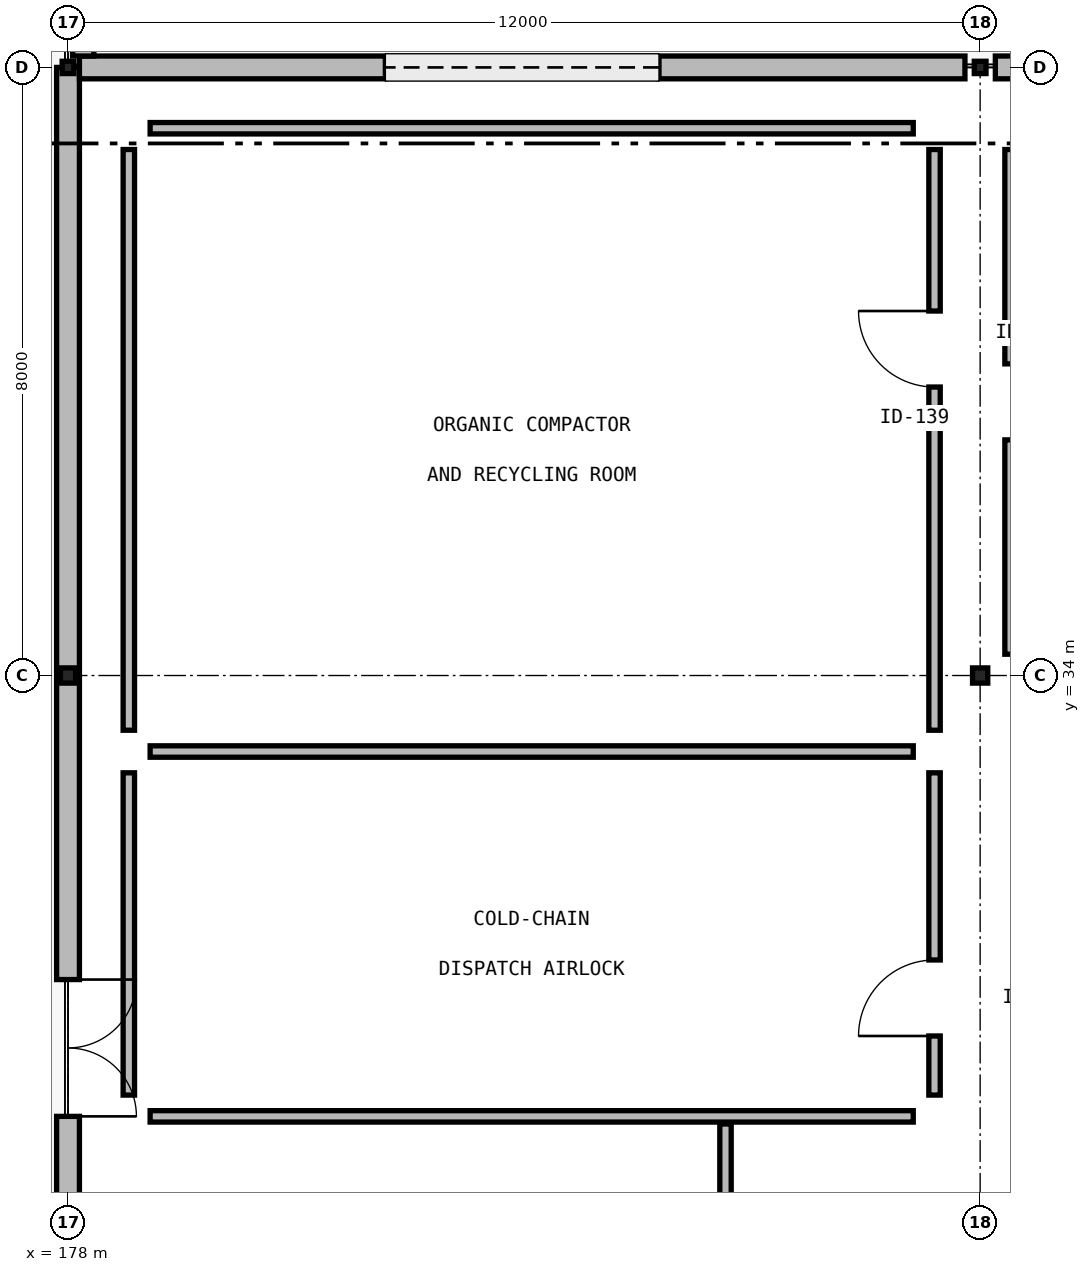
"""IFC4 building model, lengths in metres.
Left out: names, types, materials, properties, quantities, classifications, styles, units other than length and angle.
Written with IfcOpenShell. Run it as: python <this file> out.ifc"""

import sys

from ifc_helpers import new_model, si_unit, direction, frame, frame_2d, origin, origin_2d_with_axis, place, context, subcontext, project, spatial, rectangle, hollow_rectangle, i_section, extrude, element, fill, save


model = new_model("IFC4")
c1 = context("Model", 3, precision=1e-05, world=origin(), true_north=direction((0.0, 1.0)))
c2 = subcontext(c1, "Body", "Model", "MODEL_VIEW")
j1 = project(units=[si_unit("LENGTHUNIT", "METRE"), si_unit("PLANEANGLEUNIT", "RADIAN")], contexts=[c1])
p1 = place(None, origin())
s1 = spatial("IfcSite", under=j1, at=p1, CompositionType="ELEMENT")
p2 = place(p1, origin())
s2 = spatial("IfcBuilding", under=s1, at=p2, CompositionType="ELEMENT")
p3 = place(p2, origin())
s3 = spatial("IfcBuildingStorey", under=s2, at=p3, CompositionType="ELEMENT", Elevation=0.0)
p4 = place(p3, frame((178.0, 34.0, 0.0), z_axis=(0.0, 0.0, 1.0), x_axis=(1.0, 0.0, 0.0)))
e1 = element("IfcColumn", 1, at=p4, inside=s3, PredefinedType="COLUMN", context=c2, shape_type="SweptSolid", body=[
    extrude(hollow_rectangle(XDim=0.2, YDim=0.2, WallThickness=0.008, InnerFilletRadius=0.008, OuterFilletRadius=0.016, at=origin_2d_with_axis()), origin(), (0.0, 0.0, 1.0), 4.63),
])
p5 = place(p3, frame((178.0, 42.0, -0.28), z_axis=(0.0, 0.0, 1.0), x_axis=(1.0, 0.0, 0.0)))
e2 = element("IfcColumn", 2, at=p5, inside=s3, PredefinedType="COLUMN", context=c2, shape_type="SweptSolid", body=[
    extrude(i_section(OverallWidth=0.154, OverallDepth=0.162, WebThickness=0.008, FlangeThickness=0.011, FilletRadius=0.009, at=origin_2d_with_axis()), origin(), (0.0, 0.0, 1.0), 4.91),
])
p6 = place(p3, frame((190.0, 34.0, 0.0), z_axis=(0.0, 0.0, 1.0), x_axis=(1.0, 0.0, 0.0)))
e3 = element("IfcColumn", 3, at=p6, inside=s3, PredefinedType="COLUMN", context=c2, shape_type="SweptSolid", body=[
    extrude(hollow_rectangle(XDim=0.2, YDim=0.2, WallThickness=0.008, InnerFilletRadius=0.008, OuterFilletRadius=0.016, at=origin_2d_with_axis()), origin(), (0.0, 0.0, 1.0), 4.63),
])
p7 = place(p3, frame((190.0, 42.0, -0.28), z_axis=(0.0, 0.0, 1.0), x_axis=(1.0, 0.0, 0.0)))
e4 = element("IfcColumn", 4, at=p7, inside=s3, PredefinedType="COLUMN", context=c2, shape_type="SweptSolid", body=[
    extrude(i_section(OverallWidth=0.154, OverallDepth=0.162, WebThickness=0.008, FlangeThickness=0.011, FilletRadius=0.009, at=origin_2d_with_axis()), origin(), (0.0, 0.0, 1.0), 4.91),
])
p8 = place(p3, frame((178.0, 42.0, 0.0), z_axis=(0.0, 0.0, 1.0), x_axis=(0.0, -1.0, 0.0)))
e5 = element("IfcWall", 5, at=p8, inside=s3, PredefinedType="SOLIDWALL", context=c2, shape_type="SweptSolid", body=[
    extrude(rectangle(XDim=28.0, YDim=0.3, at=frame_2d((14.0, 0.0), x_axis=(1.0, 0.0))), origin(), (0.0, 0.0, 1.0), 4.18),
])
p9 = place(p8, frame((12.0, 0.0, 0.0)))
e6 = element("IfcOpeningElement", 6, at=p9, cuts=e5, PredefinedType="OPENING", context=c2, shape_type="SweptSolid", body=[
    extrude(rectangle(XDim=1.8, YDim=2.4, at=frame_2d((0.9, 1.2), x_axis=(1.0, 0.0))), frame((0.0, 0.16, 0.0), z_axis=(0.0, -1.0, 0.0), x_axis=(1.0, 0.0, 0.0)), (0.0, 0.0, 1.0), 0.32),
])
p10 = place(p3, frame((189.8, 42.0, 0.0), z_axis=(0.0, 0.0, 1.0), x_axis=(-1.0, 0.0, 0.0)))
e7 = element("IfcWall", 7, at=p10, inside=s3, PredefinedType="SOLIDWALL", context=c2, shape_type="SweptSolid", body=[
    extrude(rectangle(XDim=11.65, YDim=0.3, at=frame_2d((5.825, 0.0), x_axis=(1.0, 0.0))), origin(), (0.0, 0.0, 1.0), 4.15),
])
p11 = place(p10, frame((4.025, 0.0, 0.0)))
e8 = element("IfcOpeningElement", 8, at=p11, cuts=e7, PredefinedType="OPENING", context=c2, shape_type="SweptSolid", body=[
    extrude(rectangle(XDim=3.6, YDim=3.6, at=frame_2d((1.8, 1.8), x_axis=(1.0, 0.0))), frame((0.0, 0.16, 0.0), z_axis=(0.0, -1.0, 0.0), x_axis=(1.0, 0.0, 0.0)), (0.0, 0.0, 1.0), 0.32),
])
p12 = place(p3, frame((201.8, 42.0, 0.0), z_axis=(0.0, 0.0, 1.0), x_axis=(-1.0, 0.0, 0.0)))
e9 = element("IfcWall", 9, at=p12, inside=s3, PredefinedType="SOLIDWALL", context=c2, shape_type="SweptSolid", body=[
    extrude(rectangle(XDim=11.6, YDim=0.3, at=frame_2d((5.8, 0.0), x_axis=(1.0, 0.0))), origin(), (0.0, 0.0, 1.0), 4.15),
])
p13 = place(p12, frame((4.0, 0.0, 0.0)))
e10 = element("IfcOpeningElement", 10, at=p13, cuts=e9, PredefinedType="OPENING", context=c2, shape_type="SweptSolid", body=[
    extrude(rectangle(XDim=3.6, YDim=3.6, at=frame_2d((1.8, 1.8), x_axis=(1.0, 0.0))), frame((0.0, 0.16, 0.0), z_axis=(0.0, -1.0, 0.0), x_axis=(1.0, 0.0, 0.0)), (0.0, 0.0, 1.0), 0.32),
])
p14 = place(p3, frame((178.2, 73.6, 0.0), z_axis=(0.0, 0.0, 1.0), x_axis=(0.0, -1.0, 0.0)))
e11 = element("IfcWall", 11, at=p14, inside=s3, PredefinedType="SOLIDWALL", context=c2, shape_type="SweptSolid", body=[
    extrude(rectangle(XDim=31.45, YDim=0.28, at=frame_2d((15.725, 0.0), x_axis=(1.0, 0.0))), origin(), (0.0, 0.0, 1.0), 3.9),
])
p15 = place(p14, frame((14.0, 0.0, 0.0)))
e12 = element("IfcOpeningElement", 12, at=p15, cuts=e11, PredefinedType="OPENING", context=c2, shape_type="SweptSolid", body=[
    extrude(rectangle(XDim=1.8, YDim=2.4, at=frame_2d((0.9, 1.2), x_axis=(1.0, 0.0))), frame((0.0, 0.15, 0.0), z_axis=(0.0, -1.0, 0.0), x_axis=(1.0, 0.0, 0.0)), (0.0, 0.0, 1.0), 0.3),
])
p16 = place(p3, frame((186.65, 23.18, 0.0), z_axis=(0.0, 0.0, 1.0), x_axis=(0.0, 1.0, 0.0)))
e13 = element("IfcWall", 13, at=p16, inside=s3, PredefinedType="PARTITIONING", context=c2, shape_type="SweptSolid", body=[
    extrude(rectangle(XDim=4.92, YDim=0.15, at=frame_2d((2.46, 0.0), x_axis=(1.0, 0.0))), origin(), (0.0, 0.0, 1.0), 4.08),
])
p17 = place(p16, frame((1.96, 0.0, 0.0)))
e14 = element("IfcOpeningElement", 14, at=p17, cuts=e13, PredefinedType="OPENING", context=c2, shape_type="SweptSolid", body=[
    extrude(rectangle(XDim=1.0, YDim=2.15, at=frame_2d((0.5, 1.075), x_axis=(1.0, 0.0))), frame((0.0, 0.085, 0.0), z_axis=(0.0, -1.0, 0.0), x_axis=(1.0, 0.0, 0.0)), (0.0, 0.0, 1.0), 0.17),
])
p18 = place(p3, frame((190.4, 40.92, 0.0), z_axis=(0.0, 0.0, 1.0), x_axis=(0.0, -1.0, 0.0)))
e15 = element("IfcWall", 15, at=p18, inside=s3, PredefinedType="PARTITIONING", context=c2, shape_type="SweptSolid", body=[
    extrude(rectangle(XDim=6.64, YDim=0.15, at=frame_2d((3.32, 0.0), x_axis=(1.0, 0.0))), origin(), (0.0, 0.0, 1.0), 3.62),
])
p19 = place(p18, frame((2.82, 0.0, 0.0)))
e16 = element("IfcOpeningElement", 16, at=p19, cuts=e15, PredefinedType="OPENING", context=c2, shape_type="SweptSolid", body=[
    extrude(rectangle(XDim=1.0, YDim=2.15, at=frame_2d((0.5, 1.075), x_axis=(1.0, 0.0))), frame((0.0, 0.085, 0.0), z_axis=(0.0, -1.0, 0.0), x_axis=(1.0, 0.0, 0.0)), (0.0, 0.0, 1.0), 0.17),
])
p20 = place(p3, frame((179.08, 28.2, 0.0), z_axis=(0.0, 0.0, 1.0), x_axis=(1.0, 0.0, 0.0)))
e17 = element("IfcWall", 17, at=p20, inside=s3, PredefinedType="PARTITIONING", context=c2, shape_type="SweptSolid", body=[
    extrude(rectangle(XDim=10.04, YDim=0.15, at=frame_2d((5.02, 0.0), x_axis=(1.0, 0.0))), origin(), (0.0, 0.0, 1.0), 3.62),
])
p21 = place(p3, frame((189.4, 28.48, 0.0), z_axis=(0.0, 0.0, 1.0), x_axis=(0.0, 1.0, 0.0)))
e18 = element("IfcWall", 18, at=p21, inside=s3, PredefinedType="PARTITIONING", context=c2, shape_type="SweptSolid", body=[
    extrude(rectangle(XDim=4.24, YDim=0.15, at=frame_2d((2.12, 0.0), x_axis=(1.0, 0.0))), origin(), (0.0, 0.0, 1.0), 3.62),
])
p22 = place(p21, frame((0.778, 0.0, 0.0)))
e19 = element("IfcOpeningElement", 19, at=p22, cuts=e18, PredefinedType="OPENING", context=c2, shape_type="SweptSolid", body=[
    extrude(rectangle(XDim=1.0, YDim=2.15, at=frame_2d((0.5, 1.075), x_axis=(1.0, 0.0))), frame((0.0, 0.085, 0.0), z_axis=(0.0, -1.0, 0.0), x_axis=(1.0, 0.0, 0.0)), (0.0, 0.0, 1.0), 0.17),
])
p23 = place(p3, frame((189.12, 33.0, 0.0), z_axis=(0.0, 0.0, 1.0), x_axis=(-1.0, 0.0, 0.0)))
e20 = element("IfcWall", 20, at=p23, inside=s3, PredefinedType="PARTITIONING", context=c2, shape_type="SweptSolid", body=[
    extrude(rectangle(XDim=10.04, YDim=0.15, at=frame_2d((5.02, 0.0), x_axis=(1.0, 0.0))), origin(), (0.0, 0.0, 1.0), 3.62),
])
p24 = place(p3, frame((178.8, 32.72, 0.0), z_axis=(0.0, 0.0, 1.0), x_axis=(0.0, -1.0, 0.0)))
e21 = element("IfcWall", 21, at=p24, inside=s3, PredefinedType="PARTITIONING", context=c2, shape_type="SweptSolid", body=[
    extrude(rectangle(XDim=4.24, YDim=0.15, at=frame_2d((2.12, 0.0), x_axis=(1.0, 0.0))), origin(), (0.0, 0.0, 1.0), 3.62),
])
p25 = place(p3, frame((189.4, 33.28, 0.0), z_axis=(0.0, 0.0, 1.0), x_axis=(0.0, 1.0, 0.0)))
e22 = element("IfcWall", 22, at=p25, inside=s3, PredefinedType="PARTITIONING", context=c2, shape_type="SweptSolid", body=[
    extrude(rectangle(XDim=7.64, YDim=0.15, at=frame_2d((3.82, 0.0), x_axis=(1.0, 0.0))), origin(), (0.0, 0.0, 1.0), 3.62),
])
p26 = place(p25, frame((4.515, 0.0, 0.0)))
e23 = element("IfcOpeningElement", 23, at=p26, cuts=e22, PredefinedType="OPENING", context=c2, shape_type="SweptSolid", body=[
    extrude(rectangle(XDim=1.0, YDim=2.15, at=frame_2d((0.5, 1.075), x_axis=(1.0, 0.0))), frame((0.0, 0.085, 0.0), z_axis=(0.0, -1.0, 0.0), x_axis=(1.0, 0.0, 0.0)), (0.0, 0.0, 1.0), 0.17),
])
p27 = place(p3, frame((189.12, 41.2, 0.0), z_axis=(0.0, 0.0, 1.0), x_axis=(-1.0, 0.0, 0.0)))
e24 = element("IfcWall", 24, at=p27, inside=s3, PredefinedType="PARTITIONING", context=c2, shape_type="SweptSolid", body=[
    extrude(rectangle(XDim=10.04, YDim=0.15, at=frame_2d((5.02, 0.0), x_axis=(1.0, 0.0))), origin(), (0.0, 0.0, 1.0), 3.62),
])
p28 = place(p3, frame((178.8, 40.92, 0.0), z_axis=(0.0, 0.0, 1.0), x_axis=(0.0, -1.0, 0.0)))
e25 = element("IfcWall", 25, at=p28, inside=s3, PredefinedType="PARTITIONING", context=c2, shape_type="SweptSolid", body=[
    extrude(rectangle(XDim=7.64, YDim=0.15, at=frame_2d((3.82, 0.0), x_axis=(1.0, 0.0))), origin(), (0.0, 0.0, 1.0), 3.62),
])
p29 = place(p9, origin())
e26 = element("IfcDoor", 26, at=p29, inside=s3, OperationType="DOUBLE_SWING_RIGHT", PredefinedType="DOOR", context=c2, shape_type="SweptSolid", body=[
    extrude(rectangle(XDim=1.8, YDim=2.4, at=frame_2d((0.9, 1.2), x_axis=(1.0, 0.0))), frame((0.0, 0.025, 0.0), z_axis=(0.0, -1.0, 0.0), x_axis=(1.0, 0.0, 0.0)), (0.0, 0.0, 1.0), 0.05),
])
fill(e6, e26)
p30 = place(p11, origin())
e27 = element("IfcDoor", 27, at=p30, inside=s3, OperationType="ROLLINGUP", PredefinedType="DOOR", context=c2, shape_type="SweptSolid", body=[
    extrude(rectangle(XDim=3.6, YDim=3.6, at=frame_2d((1.8, 1.8), x_axis=(1.0, 0.0))), frame((0.0, 0.025, 0.0), z_axis=(0.0, -1.0, 0.0), x_axis=(1.0, 0.0, 0.0)), (0.0, 0.0, 1.0), 0.05),
])
fill(e8, e27)
p31 = place(p19, origin())
e28 = element("IfcDoor", 28, at=p31, inside=s3, OperationType="SINGLE_SWING_RIGHT", PredefinedType="DOOR", context=c2, shape_type="SweptSolid", body=[
    extrude(rectangle(XDim=1.0, YDim=2.15, at=frame_2d((0.5, 1.075), x_axis=(1.0, 0.0))), frame((0.0, 0.025, 0.0), z_axis=(0.0, -1.0, 0.0), x_axis=(1.0, 0.0, 0.0)), (0.0, 0.0, 1.0), 0.05),
])
fill(e16, e28)
p32 = place(p22, origin())
e29 = element("IfcDoor", 29, at=p32, inside=s3, OperationType="SINGLE_SWING_LEFT", PredefinedType="DOOR", context=c2, shape_type="SweptSolid", body=[
    extrude(rectangle(XDim=1.0, YDim=2.15, at=frame_2d((0.5, 1.075), x_axis=(1.0, 0.0))), frame((0.0, 0.025, 0.0), z_axis=(0.0, -1.0, 0.0), x_axis=(1.0, 0.0, 0.0)), (0.0, 0.0, 1.0), 0.05),
])
fill(e19, e29)
p33 = place(p26, origin())
e30 = element("IfcDoor", 30, at=p33, inside=s3, OperationType="SINGLE_SWING_RIGHT", PredefinedType="DOOR", context=c2, shape_type="SweptSolid", body=[
    extrude(rectangle(XDim=1.0, YDim=2.15, at=frame_2d((0.5, 1.075), x_axis=(1.0, 0.0))), frame((0.0, 0.025, 0.0), z_axis=(0.0, -1.0, 0.0), x_axis=(1.0, 0.0, 0.0)), (0.0, 0.0, 1.0), 0.05),
])
fill(e23, e30)
save(model, sys.argv[1])
